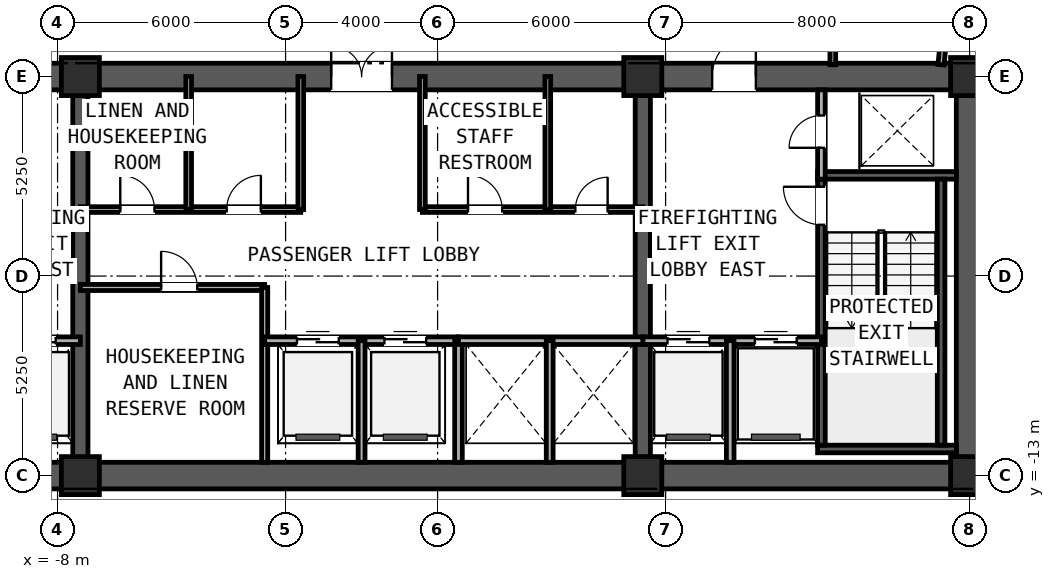
"""IFC4 building model, lengths in metres.
Left out: names, types, materials, properties, quantities, classifications, styles, units other than length and angle.
Written with IfcOpenShell. Run it as: python <this file> out.ifc"""

import sys

from ifc_helpers import new_model, si_unit, direction, frame, frame_2d, origin, origin_2d, place, context, subcontext, project, spatial, rectangle, extrude, element, fill, save


model = new_model("IFC4")
c1 = context("Model", 3, precision=1e-05, world=origin(), true_north=direction((0.0, 1.0)))
c2 = subcontext(c1, "Body", "Model", "MODEL_VIEW")
j1 = project(units=[si_unit("LENGTHUNIT", "METRE"), si_unit("PLANEANGLEUNIT", "RADIAN")], contexts=[c1])
p1 = place(None, origin())
s1 = spatial("IfcSite", under=j1, at=p1, CompositionType="ELEMENT")
p2 = place(p1, origin())
s2 = spatial("IfcBuilding", under=s1, at=p2, CompositionType="ELEMENT")
p3 = place(p2, frame((0.0, 0.0, 166.95)))
s3 = spatial("IfcBuildingStorey", under=s2, at=p3, CompositionType="ELEMENT", Elevation=166.95)
p4 = place(p3, frame((-16.35, -13.0, 0.0), z_axis=(0.0, 0.0, 1.0), x_axis=(1.0, 0.0, 0.0)))
e1 = element("IfcWall", 1, at=p4, inside=s3, PredefinedType="SHEAR", context=c2, shape_type="SweptSolid", body=[
    extrude(rectangle(XDim=32.7, YDim=0.7, at=frame_2d((16.35, 0.0))), origin(), (0.0, 0.0, 1.0), 2.91),
])
p5 = place(p3, frame((-16.35, -2.5, 0.0), z_axis=(0.0, 0.0, 1.0), x_axis=(1.0, 0.0, 0.0)))
e2 = element("IfcWall", 2, at=p5, inside=s3, PredefinedType="SHEAR", context=c2, shape_type="SweptSolid", body=[
    extrude(rectangle(XDim=32.7, YDim=0.7, at=frame_2d((16.35, 0.0))), origin(), (0.0, 0.0, 1.0), 2.91),
])
p6 = place(p5, frame((5.975, 0.0, 0.0)))
e3 = element("IfcOpeningElement", 3, at=p6, cuts=e2, PredefinedType="OPENING", context=c2, shape_type="SweptSolid", body=[
    extrude(rectangle(XDim=1.15, YDim=2.0, at=frame_2d((0.575, 1.0))), frame((0.0, 0.36, 0.0), z_axis=(0.0, -1.0, 0.0), x_axis=(1.0, 0.0, 0.0)), (0.0, 0.0, 1.0), 0.72),
])
p7 = place(p5, frame((15.55, 0.0, 0.0)))
e4 = element("IfcOpeningElement", 4, at=p7, cuts=e2, PredefinedType="OPENING", context=c2, shape_type="SweptSolid", body=[
    extrude(rectangle(XDim=1.6, YDim=2.0, at=frame_2d((0.8, 1.0))), frame((0.0, 0.36, 0.0), z_axis=(0.0, -1.0, 0.0), x_axis=(1.0, 0.0, 0.0)), (0.0, 0.0, 1.0), 0.72),
])
p8 = place(p5, frame((25.575, 0.0, 0.0)))
e5 = element("IfcOpeningElement", 5, at=p8, cuts=e2, PredefinedType="OPENING", context=c2, shape_type="SweptSolid", body=[
    extrude(rectangle(XDim=1.15, YDim=2.0, at=frame_2d((0.575, 1.0))), frame((0.0, 0.36, 0.0), z_axis=(0.0, -1.0, 0.0), x_axis=(1.0, 0.0, 0.0)), (0.0, 0.0, 1.0), 0.72),
])
p9 = place(p3, frame((16.0, -12.65, 0.0), z_axis=(0.0, 0.0, 1.0), x_axis=(0.0, 1.0, 0.0)))
e6 = element("IfcWall", 6, at=p9, inside=s3, PredefinedType="SHEAR", context=c2, shape_type="SweptSolid", body=[
    extrude(rectangle(XDim=9.8, YDim=0.7, at=frame_2d((4.9, 0.0))), origin(), (0.0, 0.0, 1.0), 2.91),
])
for number, where, z_axis, x_axis in (
    (7, (-7.4, -12.65, 0.0), (0.0, 0.0, 1.0), (0.0, 1.0, 0.0)),
    (8, (7.4, -12.65, 0.0), (0.0, 0.0, 1.0), (0.0, 1.0, 0.0)),
):
    element("IfcWall", number, at=place(p3, frame(where, z_axis=z_axis, x_axis=x_axis)), inside=s3, PredefinedType="SHEAR", context=c2, shape_type="SweptSolid", body=[
        extrude(rectangle(XDim=9.8, YDim=0.4, at=frame_2d((4.9, 0.0))), origin(), (0.0, 0.0, 1.0), 3.19),
    ])
for number, where, z_axis, x_axis in (
    (9, (12.0, -12.3, 0.0), (0.0, 0.0, 1.0), (1.0, 0.0, 0.0)),
    (10, (12.0, -5.1, 0.0), (0.0, 0.0, 1.0), (1.0, 0.0, 0.0)),
):
    element("IfcWall", number, at=place(p3, frame(where, z_axis=z_axis, x_axis=x_axis)), inside=s3, PredefinedType="SOLIDWALL", context=c2, shape_type="SweptSolid", body=[
        extrude(rectangle(XDim=3.65, YDim=0.2, at=frame_2d((1.825, 0.0))), origin(), (0.0, 0.0, 1.0), 3.19),
    ])
p10 = place(p3, frame((12.1, -12.2, 0.0), z_axis=(0.0, 0.0, 1.0), x_axis=(0.0, 1.0, 0.0)))
e11 = element("IfcWall", 11, at=p10, inside=s3, PredefinedType="SOLIDWALL", context=c2, shape_type="SweptSolid", body=[
    extrude(rectangle(XDim=7.0, YDim=0.2, at=frame_2d((3.5, 0.0))), origin(), (0.0, 0.0, 1.0), 3.19),
])
p11 = place(p10, frame((5.8, 0.0, 0.0)))
e12 = element("IfcOpeningElement", 12, at=p11, cuts=e11, PredefinedType="OPENING", context=c2, shape_type="SweptSolid", body=[
    extrude(rectangle(XDim=1.0, YDim=2.1, at=frame_2d((0.5, 1.05))), frame((0.0, 0.11, 0.0), z_axis=(0.0, -1.0, 0.0), x_axis=(1.0, 0.0, 0.0)), (0.0, 0.0, 1.0), 0.22),
])
p12 = place(p3, frame((15.25, -12.2, 0.0), z_axis=(0.0, 0.0, 1.0), x_axis=(0.0, 1.0, 0.0)))
e13 = element("IfcWall", 13, at=p12, inside=s3, PredefinedType="SOLIDWALL", context=c2, shape_type="SweptSolid", body=[
    extrude(rectangle(XDim=7.0, YDim=0.2, at=frame_2d((3.5, 0.0))), origin(), (0.0, 0.0, 1.0), 3.19),
])
for number, where, z_axis, x_axis in (
    (14, (-7.4, -13.0, 0.0), (0.0, 0.0, 1.0), (1.0, 0.0, 0.0)),
    (15, (7.4, -13.0, 0.0), (0.0, 0.0, 1.0), (1.0, 0.0, 0.0)),
    (16, (16.0, -13.0, 0.0), (0.0, 0.0, 1.0), (1.0, 0.0, 0.0)),
    (17, (-7.4, -2.5, 0.0), (0.0, 0.0, 1.0), (1.0, 0.0, 0.0)),
    (18, (7.4, -2.5, 0.0), (0.0, 0.0, 1.0), (1.0, 0.0, 0.0)),
    (19, (16.0, -2.5, 0.0), (0.0, 0.0, 1.0), (1.0, 0.0, 0.0)),
):
    element("IfcColumn", number, at=place(p3, frame(where, z_axis=z_axis, x_axis=x_axis)), inside=s3, PredefinedType="COLUMN", context=c2, shape_type="SweptSolid", body=[
        extrude(rectangle(XDim=1.0, YDim=1.0, at=origin_2d()), origin(), (0.0, 0.0, 1.0), 3.45),
    ])
p13 = place(p3, frame((-26.695, -13.016, 0.0), z_axis=(0.0, 0.0, 1.0), x_axis=(0.995396268366, -0.095845025554, 0.0)))
e20 = element("IfcWall", 20, at=p13, inside=s3, PredefinedType="STANDARD", context=c2, shape_type="SweptSolid", body=[
    extrude(rectangle(XDim=49.6, YDim=0.24, at=frame_2d((24.8, 0.0))), origin(), (0.0, 0.0, 1.0), 3.19),
])
p14 = place(p13, frame((6.044, 0.0, 0.7)))
e21 = element("IfcOpeningElement", 21, at=p14, cuts=e20, PredefinedType="OPENING", context=c2, shape_type="SweptSolid", body=[
    extrude(rectangle(XDim=1.8, YDim=1.5, at=frame_2d((0.9, 0.75))), frame((0.0, 0.13, 0.0), z_axis=(0.0, -1.0, 0.0), x_axis=(1.0, 0.0, 0.0)), (0.0, 0.0, 1.0), 0.26),
])
p15 = place(p13, frame((41.756, 0.0, 0.7)))
e22 = element("IfcOpeningElement", 22, at=p15, cuts=e20, PredefinedType="OPENING", context=c2, shape_type="SweptSolid", body=[
    extrude(rectangle(XDim=1.8, YDim=1.5, at=frame_2d((0.9, 0.75))), frame((0.0, 0.13, 0.0), z_axis=(0.0, -1.0, 0.0), x_axis=(1.0, 0.0, 0.0)), (0.0, 0.0, 1.0), 0.26),
])
p16 = place(p3, frame((12.1, -5.2, 0.0), z_axis=(0.0, 0.0, 1.0), x_axis=(0.0, 1.0, 0.0)))
e23 = element("IfcWall", 23, at=p16, inside=s3, PredefinedType="PARTITIONING", context=c2, shape_type="SweptSolid", body=[
    extrude(rectangle(XDim=2.35, YDim=0.2, at=frame_2d((1.175, 0.0))), origin(), (0.0, 0.0, 1.0), 2.225),
])
p17 = place(p16, frame((0.825, 0.0, 0.0)))
e24 = element("IfcOpeningElement", 24, at=p17, cuts=e23, PredefinedType="OPENING", context=c2, shape_type="SweptSolid", body=[
    extrude(rectangle(XDim=0.85, YDim=2.05, at=frame_2d((0.425, 1.025))), frame((0.0, 0.11, 0.0), z_axis=(0.0, -1.0, 0.0), x_axis=(1.0, 0.0, 0.0)), (0.0, 0.0, 1.0), 0.22),
])
p18 = place(p3, frame((-12.1, -9.45, 0.0), z_axis=(0.0, 0.0, 1.0), x_axis=(1.0, 0.0, 0.0)))
e25 = element("IfcWall", 25, at=p18, inside=s3, PredefinedType="PARTITIONING", context=c2, shape_type="SweptSolid", body=[
    extrude(rectangle(XDim=4.7, YDim=0.2, at=frame_2d((2.35, 0.0))), origin(), (0.0, 0.0, 1.0), 3.19),
])
p19 = place(p18, frame((0.65, 0.0, 0.0)))
e26 = element("IfcOpeningElement", 26, at=p19, cuts=e25, PredefinedType="OPENING", context=c2, shape_type="SweptSolid", body=[
    extrude(rectangle(XDim=1.1, YDim=2.2, at=frame_2d((0.55, 1.1))), frame((0.0, 0.11, 0.0), z_axis=(0.0, -1.0, 0.0), x_axis=(1.0, 0.0, 0.0)), (0.0, 0.0, 1.0), 0.22),
])
p20 = place(p18, frame((2.95, 0.0, 0.0)))
e27 = element("IfcOpeningElement", 27, at=p20, cuts=e25, PredefinedType="OPENING", context=c2, shape_type="SweptSolid", body=[
    extrude(rectangle(XDim=1.1, YDim=2.2, at=frame_2d((0.55, 1.1))), frame((0.0, 0.11, 0.0), z_axis=(0.0, -1.0, 0.0), x_axis=(1.0, 0.0, 0.0)), (0.0, 0.0, 1.0), 0.22),
])
p21 = place(p3, frame((7.4, -9.45, 0.0), z_axis=(0.0, 0.0, 1.0), x_axis=(1.0, 0.0, 0.0)))
e28 = element("IfcWall", 28, at=p21, inside=s3, PredefinedType="PARTITIONING", context=c2, shape_type="SweptSolid", body=[
    extrude(rectangle(XDim=4.7, YDim=0.2, at=frame_2d((2.35, 0.0))), origin(), (0.0, 0.0, 1.0), 3.19),
])
p22 = place(p21, frame((2.95, 0.0, 0.0)))
e29 = element("IfcOpeningElement", 29, at=p22, cuts=e28, PredefinedType="OPENING", context=c2, shape_type="SweptSolid", body=[
    extrude(rectangle(XDim=1.1, YDim=2.2, at=frame_2d((0.55, 1.1))), frame((0.0, 0.11, 0.0), z_axis=(0.0, -1.0, 0.0), x_axis=(1.0, 0.0, 0.0)), (0.0, 0.0, 1.0), 0.22),
])
p23 = place(p21, frame((0.65, 0.0, 0.0)))
e30 = element("IfcOpeningElement", 30, at=p23, cuts=e28, PredefinedType="OPENING", context=c2, shape_type="SweptSolid", body=[
    extrude(rectangle(XDim=1.1, YDim=2.2, at=frame_2d((0.55, 1.1))), frame((0.0, 0.11, 0.0), z_axis=(0.0, -1.0, 0.0), x_axis=(1.0, 0.0, 0.0)), (0.0, 0.0, 1.0), 0.22),
])
p24 = place(p3, frame((9.7, -12.65, 0.0), z_axis=(0.0, 0.0, 1.0), x_axis=(0.0, 1.0, 0.0)))
e31 = element("IfcWall", 31, at=p24, inside=s3, PredefinedType="PARTITIONING", context=c2, shape_type="SweptSolid", body=[
    extrude(rectangle(XDim=3.2, YDim=0.2, at=frame_2d((1.6, 0.0))), origin(), (0.0, 0.0, 1.0), 2.225),
])
p25 = place(p3, frame((-7.4, -8.05, 0.0), z_axis=(0.0, 0.0, 1.0), x_axis=(1.0, 0.0, 0.0)))
e32 = element("IfcWall", 32, at=p25, inside=s3, PredefinedType="PARTITIONING", context=c2, shape_type="SweptSolid", body=[
    extrude(rectangle(XDim=4.85, YDim=0.16, at=frame_2d((2.425, 0.0))), origin(), (0.0, 0.0, 1.0), 3.19),
])
p26 = place(p25, frame((2.125, 0.0, 0.0)))
e33 = element("IfcOpeningElement", 33, at=p26, cuts=e32, PredefinedType="OPENING", context=c2, shape_type="SweptSolid", body=[
    extrude(rectangle(XDim=0.95, YDim=2.15, at=frame_2d((0.475, 1.075))), frame((0.0, 0.09, 0.0), z_axis=(0.0, -1.0, 0.0), x_axis=(1.0, 0.0, 0.0)), (0.0, 0.0, 1.0), 0.18),
])
p27 = place(p3, frame((-2.55, -12.65, 0.0), z_axis=(0.0, 0.0, 1.0), x_axis=(0.0, 1.0, 0.0)))
e34 = element("IfcWall", 34, at=p27, inside=s3, PredefinedType="PARTITIONING", context=c2, shape_type="SweptSolid", body=[
    extrude(rectangle(XDim=4.6, YDim=0.16, at=frame_2d((2.3, 0.0))), origin(), (0.0, 0.0, 1.0), 2.225),
])
p28 = place(p3, frame((-2.55, -9.45, 0.0), z_axis=(0.0, 0.0, 1.0), x_axis=(1.0, 0.0, 0.0)))
e35 = element("IfcWall", 35, at=p28, inside=s3, PredefinedType="PARTITIONING", context=c2, shape_type="SweptSolid", body=[
    extrude(rectangle(XDim=5.1, YDim=0.2, at=frame_2d((2.55, 0.0))), origin(), (0.0, 0.0, 1.0), 3.19),
])
p29 = place(p28, frame((0.85, 0.0, 0.0)))
e36 = element("IfcOpeningElement", 36, at=p29, cuts=e35, PredefinedType="OPENING", context=c2, shape_type="SweptSolid", body=[
    extrude(rectangle(XDim=1.1, YDim=2.2, at=frame_2d((0.55, 1.1))), frame((0.0, 0.11, 0.0), z_axis=(0.0, -1.0, 0.0), x_axis=(1.0, 0.0, 0.0)), (0.0, 0.0, 1.0), 0.22),
])
p30 = place(p28, frame((3.15, 0.0, 0.0)))
e37 = element("IfcOpeningElement", 37, at=p30, cuts=e35, PredefinedType="OPENING", context=c2, shape_type="SweptSolid", body=[
    extrude(rectangle(XDim=1.1, YDim=2.2, at=frame_2d((0.55, 1.1))), frame((0.0, 0.11, 0.0), z_axis=(0.0, -1.0, 0.0), x_axis=(1.0, 0.0, 0.0)), (0.0, 0.0, 1.0), 0.22),
])
p31 = place(p3, frame((0.0, -12.65, 0.0), z_axis=(0.0, 0.0, 1.0), x_axis=(0.0, 1.0, 0.0)))
e38 = element("IfcWall", 38, at=p31, inside=s3, PredefinedType="PARTITIONING", context=c2, shape_type="SweptSolid", body=[
    extrude(rectangle(XDim=3.2, YDim=0.18, at=frame_2d((1.6, 0.0))), origin(), (0.0, 0.0, 1.0), 2.225),
])
p32 = place(p3, frame((2.55, -12.65, 0.0), z_axis=(0.0, 0.0, 1.0), x_axis=(0.0, 1.0, 0.0)))
e39 = element("IfcWall", 39, at=p32, inside=s3, PredefinedType="PARTITIONING", context=c2, shape_type="SweptSolid", body=[
    extrude(rectangle(XDim=3.2, YDim=0.2, at=frame_2d((1.6, 0.0))), origin(), (0.0, 0.0, 1.0), 2.225),
])
p33 = place(p3, frame((2.55, -9.45, 0.0), z_axis=(0.0, 0.0, 1.0), x_axis=(1.0, 0.0, 0.0)))
e40 = element("IfcWall", 40, at=p33, inside=s3, PredefinedType="PARTITIONING", context=c2, shape_type="SweptSolid", body=[
    extrude(rectangle(XDim=4.85, YDim=0.2, at=frame_2d((2.425, 0.0))), origin(), (0.0, 0.0, 1.0), 3.19),
])
p34 = place(p3, frame((4.95, -12.65, 0.0), z_axis=(0.0, 0.0, 1.0), x_axis=(0.0, 1.0, 0.0)))
e41 = element("IfcWall", 41, at=p34, inside=s3, PredefinedType="PARTITIONING", context=c2, shape_type="SweptSolid", body=[
    extrude(rectangle(XDim=3.2, YDim=0.18, at=frame_2d((1.6, 0.0))), origin(), (0.0, 0.0, 1.0), 2.225),
])
p35 = place(p3, frame((-7.4, -6.0, 0.0), z_axis=(0.0, 0.0, 1.0), x_axis=(1.0, 0.0, 0.0)))
e42 = element("IfcWall", 42, at=p35, inside=s3, PredefinedType="PARTITIONING", context=c2, shape_type="SweptSolid", body=[
    extrude(rectangle(XDim=5.8, YDim=0.15, at=frame_2d((2.9, 0.0))), origin(), (0.0, 0.0, 1.0), 3.19),
])
p36 = place(p35, frame((1.05, 0.0, 0.0)))
e43 = element("IfcOpeningElement", 43, at=p36, cuts=e42, PredefinedType="OPENING", context=c2, shape_type="SweptSolid", body=[
    extrude(rectangle(XDim=0.9, YDim=2.1, at=frame_2d((0.45, 1.05))), frame((0.0, 0.085, 0.0), z_axis=(0.0, -1.0, 0.0), x_axis=(1.0, 0.0, 0.0)), (0.0, 0.0, 1.0), 0.17),
])
p37 = place(p35, frame((3.85, 0.0, 0.0)))
e44 = element("IfcOpeningElement", 44, at=p37, cuts=e42, PredefinedType="OPENING", context=c2, shape_type="SweptSolid", body=[
    extrude(rectangle(XDim=0.9, YDim=2.1, at=frame_2d((0.45, 1.05))), frame((0.0, 0.085, 0.0), z_axis=(0.0, -1.0, 0.0), x_axis=(1.0, 0.0, 0.0)), (0.0, 0.0, 1.0), 0.17),
])
p38 = place(p3, frame((-1.6, -6.0, 0.0), z_axis=(0.0, 0.0, 1.0), x_axis=(0.0, 1.0, 0.0)))
e45 = element("IfcWall", 45, at=p38, inside=s3, PredefinedType="PARTITIONING", context=c2, shape_type="SweptSolid", body=[
    extrude(rectangle(XDim=3.5, YDim=0.15, at=frame_2d((1.75, 0.0))), origin(), (0.0, 0.0, 1.0), 2.225),
])
p39 = place(p3, frame((1.6, -6.0, 0.0), z_axis=(0.0, 0.0, 1.0), x_axis=(1.0, 0.0, 0.0)))
e46 = element("IfcWall", 46, at=p39, inside=s3, PredefinedType="PARTITIONING", context=c2, shape_type="SweptSolid", body=[
    extrude(rectangle(XDim=5.8, YDim=0.15, at=frame_2d((2.9, 0.0))), origin(), (0.0, 0.0, 1.0), 3.19),
])
p40 = place(p39, frame((1.2, 0.0, 0.0)))
e47 = element("IfcOpeningElement", 47, at=p40, cuts=e46, PredefinedType="OPENING", context=c2, shape_type="SweptSolid", body=[
    extrude(rectangle(XDim=0.9, YDim=2.1, at=frame_2d((0.45, 1.05))), frame((0.0, 0.085, 0.0), z_axis=(0.0, -1.0, 0.0), x_axis=(1.0, 0.0, 0.0)), (0.0, 0.0, 1.0), 0.17),
])
p41 = place(p39, frame((4.025, 0.0, 0.0)))
e48 = element("IfcOpeningElement", 48, at=p41, cuts=e46, PredefinedType="OPENING", context=c2, shape_type="SweptSolid", body=[
    extrude(rectangle(XDim=0.85, YDim=2.05, at=frame_2d((0.425, 1.025))), frame((0.0, 0.085, 0.0), z_axis=(0.0, -1.0, 0.0), x_axis=(1.0, 0.0, 0.0)), (0.0, 0.0, 1.0), 0.17),
])
for number, where, z_axis, x_axis in (
    (49, (1.6, -6.0, 0.0), (0.0, 0.0, 1.0), (0.0, 1.0, 0.0)),
    (50, (-4.55, -6.0, 0.0), (0.0, 0.0, 1.0), (0.0, 1.0, 0.0)),
    (51, (4.9, -6.0, 0.0), (0.0, 0.0, 1.0), (0.0, 1.0, 0.0)),
):
    element("IfcWall", number, at=place(p3, frame(where, z_axis=z_axis, x_axis=x_axis)), inside=s3, PredefinedType="PARTITIONING", context=c2, shape_type="SweptSolid", body=[
        extrude(rectangle(XDim=3.5, YDim=0.15, at=frame_2d((1.75, 0.0))), origin(), (0.0, 0.0, 1.0), 2.225),
    ])
p42 = place(p3, frame((12.4, 0.59, 0.0), z_axis=(0.0, 0.0, 1.0), x_axis=(0.0, -1.0, 0.0)))
e52 = element("IfcWall", 52, at=p42, inside=s3, PredefinedType="PARTITIONING", context=c2, shape_type="SweptSolid", body=[
    extrude(rectangle(XDim=2.78, YDim=0.15, at=frame_2d((1.39, 0.0))), origin(), (0.0, 0.0, 1.0), 2.225),
])
p43 = place(p3, frame((15.823, 3.79, 0.0), z_axis=(0.0, 0.0, 1.0), x_axis=(-0.095865726078, -0.99539427493, 0.0)))
e53 = element("IfcWall", 53, at=p43, inside=s3, PredefinedType="PARTITIONING", context=c2, shape_type="SweptSolid", body=[
    extrude(rectangle(XDim=6.008, YDim=0.16, at=frame_2d((3.004, 0.0))), origin(), (0.0, 0.0, 1.0), 2.225),
])
p44 = place(p11, origin())
e54 = element("IfcDoor", 54, at=p44, inside=s3, OperationType="SINGLE_SWING_RIGHT", PredefinedType="DOOR", context=c2, shape_type="SweptSolid", body=[
    extrude(rectangle(XDim=1.0, YDim=2.1, at=frame_2d((0.5, 1.05))), frame((0.0, 0.025, 0.0), z_axis=(0.0, -1.0, 0.0), x_axis=(1.0, 0.0, 0.0)), (0.0, 0.0, 1.0), 0.05),
])
fill(e12, e54)
p45 = place(p17, frame((0.85, 0.0, 0.0), z_axis=(0.0, 0.0, 1.0), x_axis=(-1.0, 0.0, 0.0)))
e55 = element("IfcDoor", 55, at=p45, inside=s3, OperationType="SINGLE_SWING_LEFT", PredefinedType="DOOR", context=c2, shape_type="SweptSolid", body=[
    extrude(rectangle(XDim=0.85, YDim=2.05, at=frame_2d((0.425, 1.025))), frame((0.0, 0.025, 0.0), z_axis=(0.0, -1.0, 0.0), x_axis=(1.0, 0.0, 0.0)), (0.0, 0.0, 1.0), 0.05),
])
fill(e24, e55)
p46 = place(p20, origin())
e56 = element("IfcDoor", 56, at=p46, inside=s3, OperationType="SLIDING_TO_RIGHT", PredefinedType="DOOR", context=c2, shape_type="SweptSolid", body=[
    extrude(rectangle(XDim=1.1, YDim=2.2, at=frame_2d((0.55, 1.1))), frame((0.0, 0.025, 0.0), z_axis=(0.0, -1.0, 0.0), x_axis=(1.0, 0.0, 0.0)), (0.0, 0.0, 1.0), 0.05),
])
fill(e27, e56)
p47 = place(p22, origin())
e57 = element("IfcDoor", 57, at=p47, inside=s3, OperationType="SLIDING_TO_LEFT", PredefinedType="DOOR", context=c2, shape_type="SweptSolid", body=[
    extrude(rectangle(XDim=1.1, YDim=2.2, at=frame_2d((0.55, 1.1))), frame((0.0, 0.025, 0.0), z_axis=(0.0, -1.0, 0.0), x_axis=(1.0, 0.0, 0.0)), (0.0, 0.0, 1.0), 0.05),
])
fill(e29, e57)
p48 = place(p23, origin())
e58 = element("IfcDoor", 58, at=p48, inside=s3, OperationType="SLIDING_TO_RIGHT", PredefinedType="DOOR", context=c2, shape_type="SweptSolid", body=[
    extrude(rectangle(XDim=1.1, YDim=2.2, at=frame_2d((0.55, 1.1))), frame((0.0, 0.025, 0.0), z_axis=(0.0, -1.0, 0.0), x_axis=(1.0, 0.0, 0.0)), (0.0, 0.0, 1.0), 0.05),
])
fill(e30, e58)
p49 = place(p7, origin())
e59 = element("IfcDoor", 59, at=p49, inside=s3, OperationType="DOUBLE_DOOR_SINGLE_SWING", PredefinedType="DOOR", context=c2, shape_type="SweptSolid", body=[
    extrude(rectangle(XDim=1.6, YDim=2.0, at=frame_2d((0.8, 1.0))), frame((0.0, 0.025, 0.0), z_axis=(0.0, -1.0, 0.0), x_axis=(1.0, 0.0, 0.0)), (0.0, 0.0, 1.0), 0.05),
])
fill(e4, e59)
p50 = place(p8, origin())
e60 = element("IfcDoor", 60, at=p50, inside=s3, OperationType="SINGLE_SWING_RIGHT", PredefinedType="DOOR", context=c2, shape_type="SweptSolid", body=[
    extrude(rectangle(XDim=1.15, YDim=2.0, at=frame_2d((0.575, 1.0))), frame((0.0, 0.025, 0.0), z_axis=(0.0, -1.0, 0.0), x_axis=(1.0, 0.0, 0.0)), (0.0, 0.0, 1.0), 0.05),
])
fill(e5, e60)
p51 = place(p26, origin())
e61 = element("IfcDoor", 61, at=p51, inside=s3, OperationType="SINGLE_SWING_LEFT", PredefinedType="DOOR", context=c2, shape_type="SweptSolid", body=[
    extrude(rectangle(XDim=0.95, YDim=2.15, at=frame_2d((0.475, 1.075))), frame((0.0, 0.025, 0.0), z_axis=(0.0, -1.0, 0.0), x_axis=(1.0, 0.0, 0.0)), (0.0, 0.0, 1.0), 0.05),
])
fill(e33, e61)
p52 = place(p29, origin())
e62 = element("IfcDoor", 62, at=p52, inside=s3, OperationType="SLIDING_TO_RIGHT", PredefinedType="DOOR", context=c2, shape_type="SweptSolid", body=[
    extrude(rectangle(XDim=1.1, YDim=2.2, at=frame_2d((0.55, 1.1))), frame((0.0, 0.025, 0.0), z_axis=(0.0, -1.0, 0.0), x_axis=(1.0, 0.0, 0.0)), (0.0, 0.0, 1.0), 0.05),
])
fill(e36, e62)
p53 = place(p30, origin())
e63 = element("IfcDoor", 63, at=p53, inside=s3, OperationType="SLIDING_TO_RIGHT", PredefinedType="DOOR", context=c2, shape_type="SweptSolid", body=[
    extrude(rectangle(XDim=1.1, YDim=2.2, at=frame_2d((0.55, 1.1))), frame((0.0, 0.025, 0.0), z_axis=(0.0, -1.0, 0.0), x_axis=(1.0, 0.0, 0.0)), (0.0, 0.0, 1.0), 0.05),
])
fill(e37, e63)
p54 = place(p36, frame((0.9, 0.0, 0.0), z_axis=(0.0, 0.0, 1.0), x_axis=(-1.0, 0.0, 0.0)))
e64 = element("IfcDoor", 64, at=p54, inside=s3, OperationType="SINGLE_SWING_LEFT", PredefinedType="DOOR", context=c2, shape_type="SweptSolid", body=[
    extrude(rectangle(XDim=0.9, YDim=2.1, at=frame_2d((0.45, 1.05))), frame((0.0, 0.025, 0.0), z_axis=(0.0, -1.0, 0.0), x_axis=(1.0, 0.0, 0.0)), (0.0, 0.0, 1.0), 0.05),
])
fill(e43, e64)
p55 = place(p37, frame((0.9, 0.0, 0.0), z_axis=(0.0, 0.0, 1.0), x_axis=(-1.0, 0.0, 0.0)))
e65 = element("IfcDoor", 65, at=p55, inside=s3, OperationType="SINGLE_SWING_RIGHT", PredefinedType="DOOR", context=c2, shape_type="SweptSolid", body=[
    extrude(rectangle(XDim=0.9, YDim=2.1, at=frame_2d((0.45, 1.05))), frame((0.0, 0.025, 0.0), z_axis=(0.0, -1.0, 0.0), x_axis=(1.0, 0.0, 0.0)), (0.0, 0.0, 1.0), 0.05),
])
fill(e44, e65)
p56 = place(p40, frame((0.9, 0.0, 0.0), z_axis=(0.0, 0.0, 1.0), x_axis=(-1.0, 0.0, 0.0)))
e66 = element("IfcDoor", 66, at=p56, inside=s3, OperationType="SINGLE_SWING_LEFT", PredefinedType="DOOR", context=c2, shape_type="SweptSolid", body=[
    extrude(rectangle(XDim=0.9, YDim=2.1, at=frame_2d((0.45, 1.05))), frame((0.0, 0.025, 0.0), z_axis=(0.0, -1.0, 0.0), x_axis=(1.0, 0.0, 0.0)), (0.0, 0.0, 1.0), 0.05),
])
fill(e47, e66)
p57 = place(p41, frame((0.85, 0.0, 0.0), z_axis=(0.0, 0.0, 1.0), x_axis=(-1.0, 0.0, 0.0)))
e67 = element("IfcDoor", 67, at=p57, inside=s3, OperationType="SINGLE_SWING_RIGHT", PredefinedType="DOOR", context=c2, shape_type="SweptSolid", body=[
    extrude(rectangle(XDim=0.85, YDim=2.05, at=frame_2d((0.425, 1.025))), frame((0.0, 0.025, 0.0), z_axis=(0.0, -1.0, 0.0), x_axis=(1.0, 0.0, 0.0)), (0.0, 0.0, 1.0), 0.05),
])
fill(e48, e67)
save(model, sys.argv[1])
